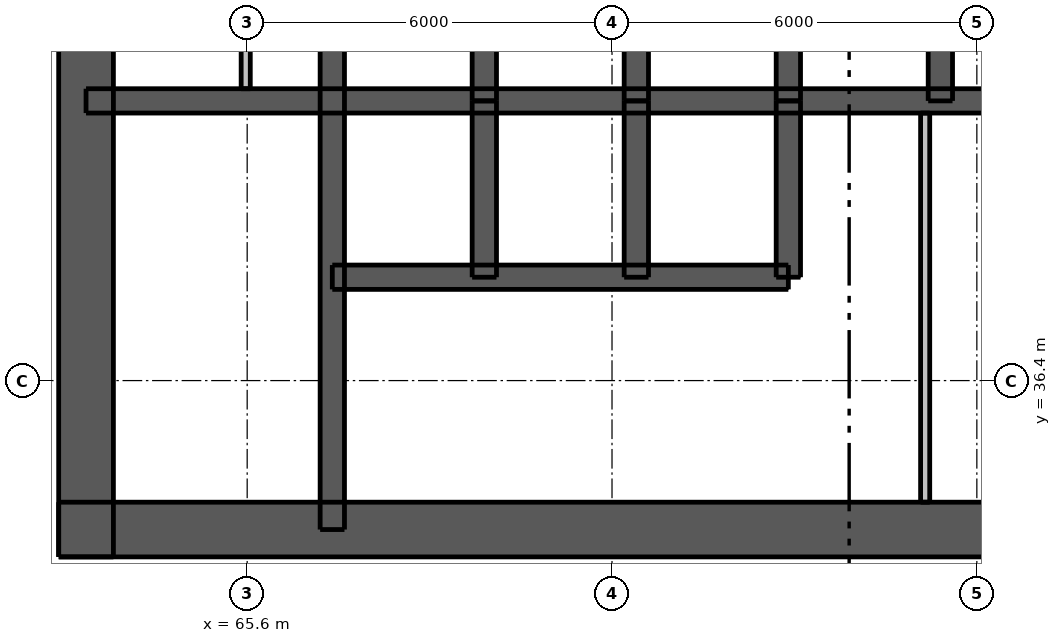
"""IFC4 building model, lengths in metres.
Left out: names, types, materials, properties, quantities, classifications, styles, units other than length and angle.
Written with IfcOpenShell. Run it as: python <this file> out.ifc"""

import sys

from ifc_helpers import new_model, si_unit, direction, frame, frame_2d, origin, place, context, subcontext, project, spatial, rectangle, extrude, element, fill, save


model = new_model("IFC4")
c1 = context("Model", 3, precision=1e-05, world=origin(), true_north=direction((0.0, 1.0)))
c2 = subcontext(c1, "Body", "Model", "MODEL_VIEW")
j1 = project(units=[si_unit("LENGTHUNIT", "METRE"), si_unit("PLANEANGLEUNIT", "RADIAN")], contexts=[c1])
p1 = place(None, origin())
s1 = spatial("IfcSite", under=j1, at=p1, CompositionType="ELEMENT")
p2 = place(p1, origin())
s2 = spatial("IfcBuilding", under=s1, at=p2, CompositionType="ELEMENT")
p3 = place(p2, frame((0.0, 0.0, 10.0)))
s3 = spatial("IfcBuildingStorey", under=s2, at=p3, CompositionType="ELEMENT", Elevation=10.0)
p4 = place(p3, frame((62.5, 33.95, 0.0), z_axis=(0.0, 0.0, 1.0), x_axis=(1.0, 0.0, 0.0)))
e1 = element("IfcWall", 1, at=p4, inside=s3, PredefinedType="SHEAR", context=c2, shape_type="SweptSolid", body=[
    extrude(rectangle(XDim=24.0, YDim=0.9, at=frame_2d((12.0, 0.0))), origin(), (0.0, 0.0, 1.0), 4.2),
])
p5 = place(p4, frame((2.05, 0.0, 0.0)))
e2 = element("IfcOpeningElement", 2, at=p5, cuts=e1, PredefinedType="OPENING", context=c2, shape_type="SweptSolid", body=[
    extrude(rectangle(XDim=1.1, YDim=2.1, at=frame_2d((0.55, 1.05))), frame((0.0, 0.46, 0.0), z_axis=(0.0, -1.0, 0.0), x_axis=(1.0, 0.0, 0.0)), (0.0, 0.0, 1.0), 0.92),
])
p6 = place(p4, frame((20.85, 0.0, 0.0)))
e3 = element("IfcOpeningElement", 3, at=p6, cuts=e1, PredefinedType="OPENING", context=c2, shape_type="SweptSolid", body=[
    extrude(rectangle(XDim=1.1, YDim=2.1, at=frame_2d((0.55, 1.05))), frame((0.0, 0.46, 0.0), z_axis=(0.0, -1.0, 0.0), x_axis=(1.0, 0.0, 0.0)), (0.0, 0.0, 1.0), 0.92),
])
p7 = place(p4, frame((8.0, 0.0, 0.0)))
e4 = element("IfcOpeningElement", 4, at=p7, cuts=e1, PredefinedType="OPENING", context=c2, shape_type="SweptSolid", body=[
    extrude(rectangle(XDim=1.1, YDim=2.1, at=frame_2d((0.55, 1.05))), frame((0.0, 0.46, 0.0), z_axis=(0.0, -1.0, 0.0), x_axis=(1.0, 0.0, 0.0)), (0.0, 0.0, 1.0), 0.92),
])
p8 = place(p4, frame((16.363, 0.0, 0.0)))
e5 = element("IfcOpeningElement", 5, at=p8, cuts=e1, PredefinedType="OPENING", context=c2, shape_type="SweptSolid", body=[
    extrude(rectangle(XDim=0.9, YDim=2.1, at=frame_2d((0.45, 1.05))), frame((0.0, 0.46, 0.0), z_axis=(0.0, -1.0, 0.0), x_axis=(1.0, 0.0, 0.0)), (0.0, 0.0, 1.0), 0.92),
])
p9 = place(p3, frame((62.95, 33.5, 0.0), z_axis=(0.0, 0.0, 1.0), x_axis=(0.0, 1.0, 0.0)))
e6 = element("IfcWall", 6, at=p9, inside=s3, PredefinedType="SHEAR", context=c2, shape_type="SweptSolid", body=[
    extrude(rectangle(XDim=24.0, YDim=0.9, at=frame_2d((12.0, 0.0))), origin(), (0.0, 0.0, 1.0), 4.2),
])
p10 = place(p9, frame((11.2, 0.0, 0.0)))
e7 = element("IfcOpeningElement", 7, at=p10, cuts=e6, PredefinedType="OPENING", context=c2, shape_type="SweptSolid", body=[
    extrude(rectangle(XDim=1.6, YDim=2.1, at=frame_2d((0.8, 1.05))), frame((0.0, 0.46, 0.0), z_axis=(0.0, -1.0, 0.0), x_axis=(1.0, 0.0, 0.0)), (0.0, 0.0, 1.0), 0.92),
])
p11 = place(p3, frame((62.95, 41.0, 0.0), z_axis=(0.0, 0.0, 1.0), x_axis=(1.0, 0.0, 0.0)))
e8 = element("IfcWall", 8, at=p11, inside=s3, PredefinedType="SHEAR", context=c2, shape_type="SweptSolid", body=[
    extrude(rectangle(XDim=23.1, YDim=0.4, at=frame_2d((11.55, 0.0))), origin(), (0.0, 0.0, 1.0), 4.2),
])
p12 = place(p3, frame((67.0, 33.95, 0.0), z_axis=(0.0, 0.0, 1.0), x_axis=(0.0, 1.0, 0.0)))
e9 = element("IfcWall", 9, at=p12, inside=s3, PredefinedType="SHEAR", context=c2, shape_type="SweptSolid", body=[
    extrude(rectangle(XDim=9.95, YDim=0.4, at=frame_2d((4.975, 0.0))), origin(), (0.0, 0.0, 1.0), 4.2),
])
p13 = place(p12, frame((0.65, 0.0, 0.0)))
e10 = element("IfcOpeningElement", 10, at=p13, cuts=e9, PredefinedType="OPENING", context=c2, shape_type="SweptSolid", body=[
    extrude(rectangle(XDim=1.1, YDim=2.1, at=frame_2d((0.55, 1.05))), frame((0.0, 0.21, 0.0), z_axis=(0.0, -1.0, 0.0), x_axis=(1.0, 0.0, 0.0)), (0.0, 0.0, 1.0), 0.42),
])
for number, where, z_axis, x_axis in (
    (11, (69.5, 41.0, 0.0), (0.0, 0.0, 1.0), (0.0, 1.0, 0.0)),
    (12, (72.0, 41.0, 0.0), (0.0, 0.0, 1.0), (0.0, 1.0, 0.0)),
    (13, (74.5, 41.0, 0.0), (0.0, 0.0, 1.0), (0.0, 1.0, 0.0)),
    (14, (77.0, 41.0, 0.0), (0.0, 0.0, 1.0), (0.0, 1.0, 0.0)),
):
    element("IfcWall", number, at=place(p3, frame(where, z_axis=z_axis, x_axis=x_axis)), inside=s3, PredefinedType="SHEAR", context=c2, shape_type="SweptSolid", body=[
        extrude(rectangle(XDim=2.9, YDim=0.4, at=frame_2d((1.45, 0.0))), origin(), (0.0, 0.0, 1.0), 4.2),
    ])
p14 = place(p3, frame((67.0, 38.1, 0.0), z_axis=(0.0, 0.0, 1.0), x_axis=(1.0, 0.0, 0.0)))
e15 = element("IfcWall", 15, at=p14, inside=s3, PredefinedType="SHEAR", context=c2, shape_type="SweptSolid", body=[
    extrude(rectangle(XDim=7.5, YDim=0.4, at=frame_2d((3.75, 0.0))), origin(), (0.0, 0.0, 1.0), 4.2),
])
p15 = place(p14, frame((0.7, 0.0, 0.0)))
e16 = element("IfcOpeningElement", 16, at=p15, cuts=e15, PredefinedType="OPENING", context=c2, shape_type="SweptSolid", body=[
    extrude(rectangle(XDim=1.1, YDim=2.1, at=frame_2d((0.55, 1.05))), frame((0.0, 0.21, 0.0), z_axis=(0.0, -1.0, 0.0), x_axis=(1.0, 0.0, 0.0)), (0.0, 0.0, 1.0), 0.42),
])
p16 = place(p14, frame((3.2, 0.0, 0.0)))
e17 = element("IfcOpeningElement", 17, at=p16, cuts=e15, PredefinedType="OPENING", context=c2, shape_type="SweptSolid", body=[
    extrude(rectangle(XDim=1.1, YDim=2.1, at=frame_2d((0.55, 1.05))), frame((0.0, 0.21, 0.0), z_axis=(0.0, -1.0, 0.0), x_axis=(1.0, 0.0, 0.0)), (0.0, 0.0, 1.0), 0.42),
])
p17 = place(p14, frame((5.65, 0.0, 0.0)))
e18 = element("IfcOpeningElement", 18, at=p17, cuts=e15, PredefinedType="OPENING", context=c2, shape_type="SweptSolid", body=[
    extrude(rectangle(XDim=1.2, YDim=2.1, at=frame_2d((0.6, 1.05))), frame((0.0, 0.21, 0.0), z_axis=(0.0, -1.0, 0.0), x_axis=(1.0, 0.0, 0.0)), (0.0, 0.0, 1.0), 0.42),
])
for number, where, z_axis, x_axis in (
    (19, (69.5, 38.1, 0.0), (0.0, 0.0, 1.0), (0.0, 1.0, 0.0)),
    (20, (72.0, 38.1, 0.0), (0.0, 0.0, 1.0), (0.0, 1.0, 0.0)),
    (21, (74.5, 38.1, 0.0), (0.0, 0.0, 1.0), (0.0, 1.0, 0.0)),
):
    element("IfcWall", number, at=place(p3, frame(where, z_axis=z_axis, x_axis=x_axis)), inside=s3, PredefinedType="SHEAR", context=c2, shape_type="SweptSolid", body=[
        extrude(rectangle(XDim=2.9, YDim=0.4, at=frame_2d((1.45, 0.0))), origin(), (0.0, 0.0, 1.0), 4.2),
    ])
p18 = place(p3, frame((76.75, 34.4, 0.0), z_axis=(0.0, 0.0, 1.0), x_axis=(0.0, 1.0, 0.0)))
e22 = element("IfcWall", 22, at=p18, inside=s3, PredefinedType="PLUMBINGWALL", context=c2, shape_type="SweptSolid", body=[
    extrude(rectangle(XDim=6.4, YDim=0.15, at=frame_2d((3.2, 0.0))), origin(), (0.0, 0.0, 1.0), 4.2),
])
p19 = place(p3, frame((65.576, 41.2, 0.0), z_axis=(0.0, 0.0, 1.0), x_axis=(0.0, 1.0, 0.0)))
e23 = element("IfcWall", 23, at=p19, inside=s3, PredefinedType="PLUMBINGWALL", context=c2, shape_type="SweptSolid", body=[
    extrude(rectangle(XDim=2.5, YDim=0.15, at=frame_2d((1.25, 0.0))), origin(), (0.0, 0.0, 1.0), 4.2),
])
p20 = place(p5, origin())
e24 = element("IfcDoor", 24, at=p20, inside=s3, OperationType="SINGLE_SWING_LEFT", PredefinedType="DOOR", context=c2, shape_type="SweptSolid", body=[
    extrude(rectangle(XDim=1.1, YDim=2.1, at=frame_2d((0.55, 1.05))), frame((0.0, 0.438, 0.0), z_axis=(0.0, -1.0, 0.0), x_axis=(1.0, 0.0, 0.0)), (0.0, 0.0, 1.0), 0.05),
])
fill(e2, e24)
p21 = place(p7, origin())
e25 = element("IfcDoor", 25, at=p21, inside=s3, OperationType="SINGLE_SWING_LEFT", PredefinedType="DOOR", context=c2, shape_type="SweptSolid", body=[
    extrude(rectangle(XDim=1.1, YDim=2.1, at=frame_2d((0.55, 1.05))), frame((0.0, 0.438, 0.0), z_axis=(0.0, -1.0, 0.0), x_axis=(1.0, 0.0, 0.0)), (0.0, 0.0, 1.0), 0.05),
])
fill(e4, e25)
p22 = place(p13, origin())
e26 = element("IfcDoor", 26, at=p22, inside=s3, OperationType="SINGLE_SWING_RIGHT", PredefinedType="DOOR", context=c2, shape_type="SweptSolid", body=[
    extrude(rectangle(XDim=1.1, YDim=2.1, at=frame_2d((0.55, 1.05))), frame((0.0, -0.138, 0.0), z_axis=(0.0, -1.0, 0.0), x_axis=(1.0, 0.0, 0.0)), (0.0, 0.0, 1.0), 0.05),
])
fill(e10, e26)
p23 = place(p15, origin())
e27 = element("IfcDoor", 27, at=p23, inside=s3, OperationType="DOUBLE_DOOR_SLIDING", PredefinedType="DOOR", context=c2, shape_type="SweptSolid", body=[
    extrude(rectangle(XDim=1.1, YDim=2.1, at=frame_2d((0.55, 1.05))), frame((0.0, 0.025, 0.0), z_axis=(0.0, -1.0, 0.0), x_axis=(1.0, 0.0, 0.0)), (0.0, 0.0, 1.0), 0.05),
])
fill(e16, e27)
p24 = place(p16, origin())
e28 = element("IfcDoor", 28, at=p24, inside=s3, OperationType="DOUBLE_DOOR_SLIDING", PredefinedType="DOOR", context=c2, shape_type="SweptSolid", body=[
    extrude(rectangle(XDim=1.1, YDim=2.1, at=frame_2d((0.55, 1.05))), frame((0.0, 0.025, 0.0), z_axis=(0.0, -1.0, 0.0), x_axis=(1.0, 0.0, 0.0)), (0.0, 0.0, 1.0), 0.05),
])
fill(e17, e28)
p25 = place(p17, origin())
e29 = element("IfcDoor", 29, at=p25, inside=s3, OperationType="DOUBLE_DOOR_SLIDING", PredefinedType="DOOR", context=c2, shape_type="SweptSolid", body=[
    extrude(rectangle(XDim=1.2, YDim=2.1, at=frame_2d((0.6, 1.05))), frame((0.0, 0.025, 0.0), z_axis=(0.0, -1.0, 0.0), x_axis=(1.0, 0.0, 0.0)), (0.0, 0.0, 1.0), 0.05),
])
fill(e18, e29)
save(model, sys.argv[1])
